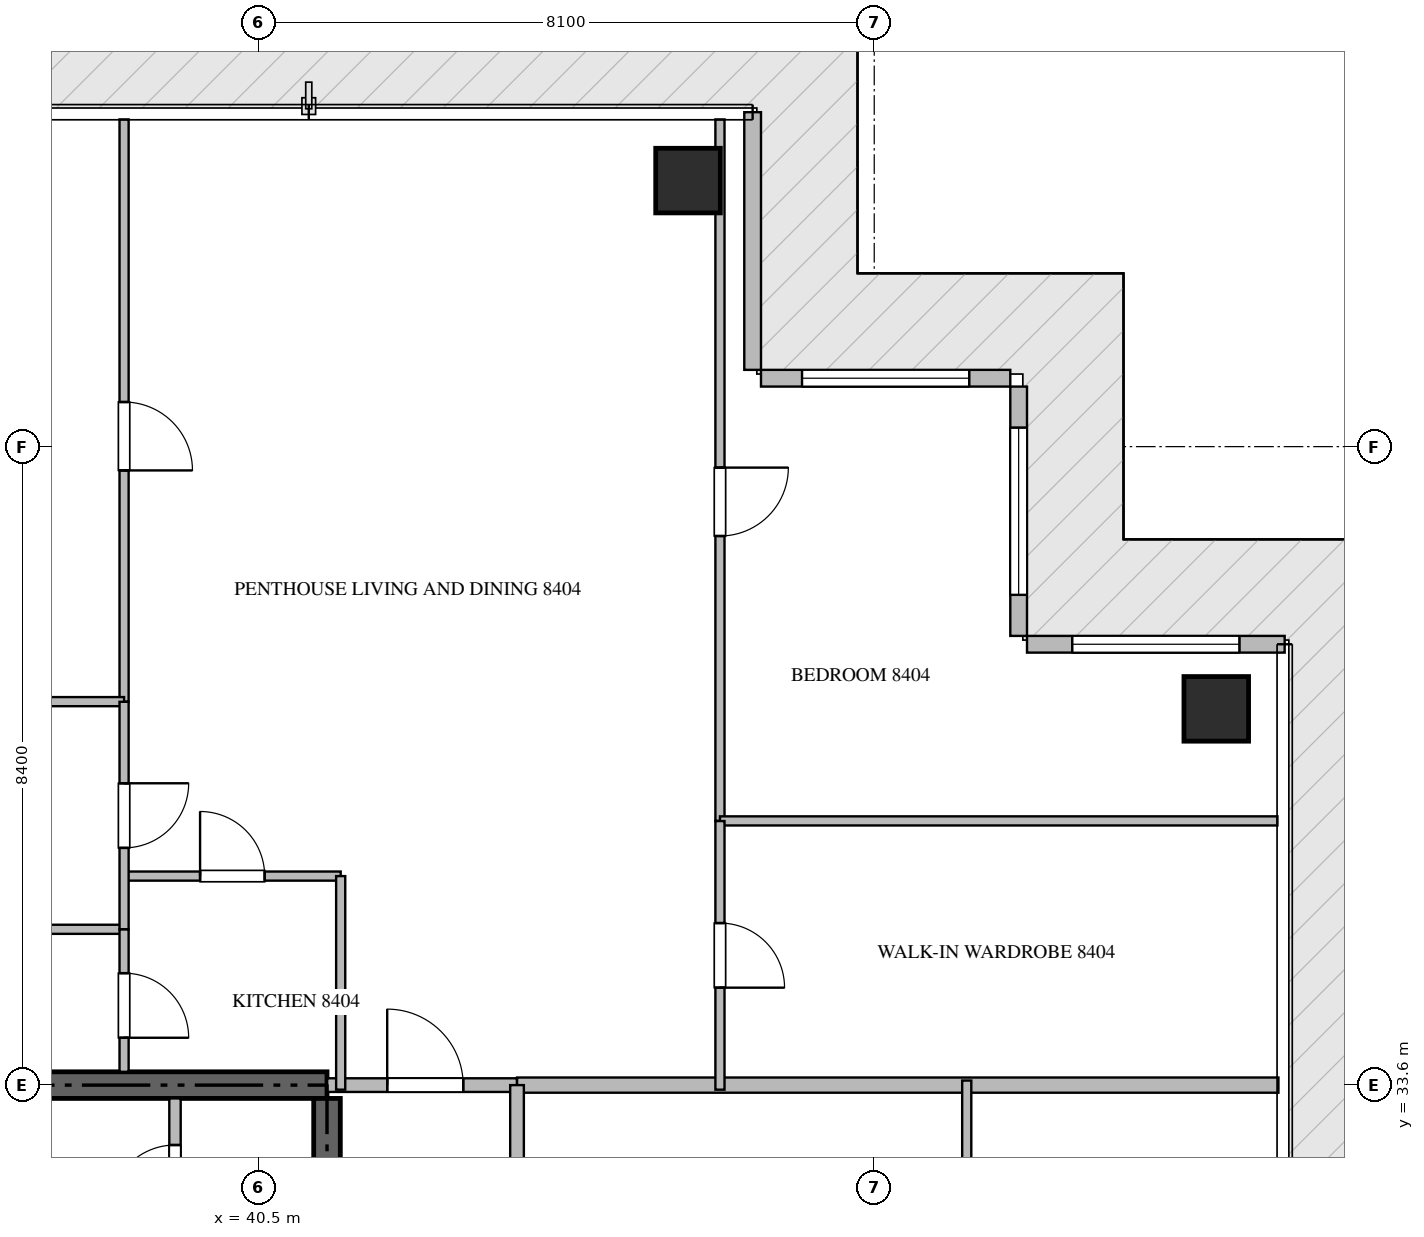
"""IFC4 building model, lengths in metres.
Left out: names, types, materials, properties, quantities, classifications, styles, units other than length and angle.
Written with IfcOpenShell. Run it as: python <this file> out.ifc"""

import sys

from ifc_helpers import new_model, si_unit, direction, frame, frame_2d, origin, origin_2d, place, context, subcontext, project, spatial, rectangle, extrude, source, transform, mapped, element, fill, save


model = new_model("IFC4")
c1 = context("Model", 3, precision=1e-05, world=origin(), true_north=direction((0.0, 1.0)))
c2 = subcontext(c1, "Body", "Model", "MODEL_VIEW")
j1 = project(units=[si_unit("LENGTHUNIT", "METRE"), si_unit("PLANEANGLEUNIT", "RADIAN")], contexts=[c1])
p1 = place(None, origin())
s1 = spatial("IfcSite", under=j1, at=p1, CompositionType="ELEMENT")
p2 = place(p1, origin())
s2 = spatial("IfcBuilding", under=s1, at=p2, CompositionType="ELEMENT")
p3 = place(p2, frame((0.0, 0.0, 338.0)))
s3 = spatial("IfcBuildingStorey", under=s2, at=p3, CompositionType="ELEMENT", Elevation=338.0)
p4 = place(p3, frame((41.4, 33.6, -0.44), z_axis=(0.0, 0.0, 1.0), x_axis=(-1.0, 0.0, 0.0)))
e1 = element("IfcWall", 1, at=p4, inside=s3, PredefinedType="SHEAR", context=c2, shape_type="SweptSolid", body=[
    extrude(rectangle(XDim=18.0, YDim=0.35, at=frame_2d((9.0, 0.0))), origin(), (0.0, 0.0, 1.0), 4.228),
])
p5 = place(p3, frame((41.4, 27.75, -0.44), z_axis=(0.0, 0.0, 1.0), x_axis=(0.0, 1.0, 0.0)))
e2 = element("IfcWall", 2, at=p5, inside=s3, PredefinedType="SHEAR", context=c2, shape_type="SweptSolid", body=[
    extrude(rectangle(XDim=5.675, YDim=0.35, at=frame_2d((2.837, 0.0))), origin(), (0.0, 0.0, 1.0), 4.228),
])
m1 = source(origin(), c2, "Body", "SweptSolid", [
    extrude(rectangle(XDim=0.85, YDim=0.85, at=origin_2d()), origin(), (0.0, 0.0, 1.0), 4.23),
])
for number, where, z_axis, x_axis in (
    (3, (46.15, 45.5, -0.44), (0.0, 0.0, 1.0), (1.0, 0.0, 0.0)),
    (4, (53.1, 38.55, -0.44), (0.0, 0.0, 1.0), (1.0, 0.0, 0.0)),
):
    element("IfcColumn", number, at=place(p3, frame(where, z_axis=z_axis, x_axis=x_axis)), inside=s3, PredefinedType="COLUMN", context=c2, shape_type="MappedRepresentation", body=[
        mapped(m1, transform((0.0, 0.0, 0.0), scale=1.0)),
    ])
p6 = place(p3, frame((54.0, 39.4, 0.0), z_axis=(0.0, 0.0, 1.0), x_axis=(-1.0, 0.0, 0.0)))
e5 = element("IfcWall", 5, at=p6, inside=s3, PredefinedType="ELEMENTEDWALL", context=c2, shape_type="SweptSolid", body=[
    extrude(rectangle(XDim=3.39, YDim=0.22, at=frame_2d((1.695, 0.0))), origin(), (0.0, 0.0, 1.0), 3.775),
])
p7 = place(p6, frame((0.595, 0.0, 0.65)))
e6 = element("IfcOpeningElement", 6, at=p7, cuts=e5, PredefinedType="OPENING", context=c2, shape_type="SweptSolid", body=[
    extrude(rectangle(XDim=2.2, YDim=2.4, at=frame_2d((1.1, 1.2))), frame((0.0, 0.12, 0.0), z_axis=(0.0, -1.0, 0.0), x_axis=(1.0, 0.0, 0.0)), (0.0, 0.0, 1.0), 0.24),
])
p8 = place(p3, frame((50.5, 39.51, 0.0), z_axis=(0.0, 0.0, 1.0), x_axis=(0.0, 1.0, 0.0)))
e7 = element("IfcWall", 7, at=p8, inside=s3, PredefinedType="ELEMENTEDWALL", context=c2, shape_type="SweptSolid", body=[
    extrude(rectangle(XDim=3.28, YDim=0.22, at=frame_2d((1.64, 0.0))), origin(), (0.0, 0.0, 1.0), 3.775),
])
p9 = place(p8, frame((0.54, 0.0, 0.65)))
e8 = element("IfcOpeningElement", 8, at=p9, cuts=e7, PredefinedType="OPENING", context=c2, shape_type="SweptSolid", body=[
    extrude(rectangle(XDim=2.2, YDim=2.4, at=frame_2d((1.1, 1.2))), frame((0.0, 0.12, 0.0), z_axis=(0.0, -1.0, 0.0), x_axis=(1.0, 0.0, 0.0)), (0.0, 0.0, 1.0), 0.24),
])
p10 = place(p3, frame((50.39, 42.9, 0.0), z_axis=(0.0, 0.0, 1.0), x_axis=(-1.0, 0.0, 0.0)))
e9 = element("IfcWall", 9, at=p10, inside=s3, PredefinedType="ELEMENTEDWALL", context=c2, shape_type="SweptSolid", body=[
    extrude(rectangle(XDim=3.28, YDim=0.22, at=frame_2d((1.64, 0.0))), origin(), (0.0, 0.0, 1.0), 3.775),
])
p11 = place(p10, frame((0.54, 0.0, 0.65)))
e10 = element("IfcOpeningElement", 10, at=p11, cuts=e9, PredefinedType="OPENING", context=c2, shape_type="SweptSolid", body=[
    extrude(rectangle(XDim=2.2, YDim=2.4, at=frame_2d((1.1, 1.2))), frame((0.0, 0.12, 0.0), z_axis=(0.0, -1.0, 0.0), x_axis=(1.0, 0.0, 0.0)), (0.0, 0.0, 1.0), 0.24),
])
p12 = place(p3, frame((47.0, 43.01, 0.0), z_axis=(0.0, 0.0, 1.0), x_axis=(0.0, 1.0, 0.0)))
e11 = element("IfcWall", 11, at=p12, inside=s3, PredefinedType="ELEMENTEDWALL", context=c2, shape_type="SweptSolid", body=[
    extrude(rectangle(XDim=3.39, YDim=0.22, at=frame_2d((1.695, 0.0))), origin(), (0.0, 0.0, 1.0), 3.775),
])
p13 = place(p3, frame((39.4, 31.35, 0.0), z_axis=(0.0, 0.0, 1.0), x_axis=(0.0, 1.0, 0.0)))
e12 = element("IfcWall", 12, at=p13, inside=s3, PredefinedType="PARTITIONING", context=c2, shape_type="SweptSolid", body=[
    extrude(rectangle(XDim=2.075, YDim=0.15, at=frame_2d((1.038, 0.0))), origin(), (0.0, 0.0, 1.0), 3.79),
])
p14 = place(p13, frame((0.612, 0.0, 0.0)))
e13 = element("IfcOpeningElement", 13, at=p14, cuts=e12, PredefinedType="OPENING", context=c2, shape_type="SweptSolid", body=[
    extrude(rectangle(XDim=0.85, YDim=2.1, at=frame_2d((0.425, 1.05))), frame((0.0, 0.085, 0.0), z_axis=(0.0, -1.0, 0.0), x_axis=(1.0, 0.0, 0.0)), (0.0, 0.0, 1.0), 0.17),
])
p15 = place(p3, frame((43.9, 33.6, 0.0), z_axis=(0.0, 0.0, 1.0), x_axis=(1.0, 0.0, 0.0)))
e14 = element("IfcWall", 14, at=p15, inside=s3, PredefinedType="PARTITIONING", context=c2, shape_type="SweptSolid", body=[
    extrude(rectangle(XDim=10.018, YDim=0.2, at=frame_2d((5.009, 0.0))), origin(), (0.0, 0.0, 1.0), 3.79),
])
p16 = place(p3, frame((41.402, 33.6, 0.0), z_axis=(0.0, 0.0, 1.0), x_axis=(1.0, 0.0, 0.0)))
e15 = element("IfcWall", 15, at=p16, inside=s3, PredefinedType="PARTITIONING", context=c2, shape_type="SweptSolid", body=[
    extrude(rectangle(XDim=2.496, YDim=0.18, at=frame_2d((1.248, 0.0))), origin(), (0.0, 0.0, 1.0), 3.79),
])
p17 = place(p16, frame((0.79, 0.0, 0.0)))
e16 = element("IfcOpeningElement", 16, at=p17, cuts=e15, PredefinedType="OPENING", context=c2, shape_type="SweptSolid", body=[
    extrude(rectangle(XDim=1.0, YDim=2.15, at=frame_2d((0.5, 1.075))), frame((0.0, 0.1, 0.0), z_axis=(0.0, -1.0, 0.0), x_axis=(1.0, 0.0, 0.0)), (0.0, 0.0, 1.0), 0.2),
])
p18 = place(p3, frame((43.9, 16.8, 0.0), z_axis=(0.0, 0.0, 1.0), x_axis=(0.0, 1.0, 0.0)))
e17 = element("IfcWall", 17, at=p18, inside=s3, PredefinedType="PARTITIONING", context=c2, shape_type="SweptSolid", body=[
    extrude(rectangle(XDim=16.8, YDim=0.18, at=frame_2d((8.4, 0.0))), origin(), (0.0, 0.0, 1.0), 3.79),
])
p19 = place(p18, frame((1.3, 0.0, 0.0)))
e18 = element("IfcOpeningElement", 18, at=p19, cuts=e17, PredefinedType="OPENING", context=c2, shape_type="SweptSolid", body=[
    extrude(rectangle(XDim=1.0, YDim=2.15, at=frame_2d((0.5, 1.075))), frame((0.0, 0.1, 0.0), z_axis=(0.0, -1.0, 0.0), x_axis=(1.0, 0.0, 0.0)), (0.0, 0.0, 1.0), 0.2),
])
p20 = place(p3, frame((38.73, 36.35, 0.0), z_axis=(0.0, 0.0, 1.0), x_axis=(1.0, 0.0, 0.0)))
e19 = element("IfcWall", 19, at=p20, inside=s3, PredefinedType="PARTITIONING", context=c2, shape_type="SweptSolid", body=[
    extrude(rectangle(XDim=2.85, YDim=0.12, at=frame_2d((1.425, 0.0))), origin(), (0.0, 0.0, 1.0), 3.79),
])
p21 = place(p20, frame((1.0, 0.0, 0.0)))
e20 = element("IfcOpeningElement", 20, at=p21, cuts=e19, PredefinedType="OPENING", context=c2, shape_type="SweptSolid", body=[
    extrude(rectangle(XDim=0.85, YDim=2.1, at=frame_2d((0.425, 1.05))), frame((0.0, 0.07, 0.0), z_axis=(0.0, -1.0, 0.0), x_axis=(1.0, 0.0, 0.0)), (0.0, 0.0, 1.0), 0.14),
])
p22 = place(p3, frame((41.58, 36.35, 0.0), z_axis=(0.0, 0.0, 1.0), x_axis=(0.0, -1.0, 0.0)))
e21 = element("IfcWall", 21, at=p22, inside=s3, PredefinedType="PARTITIONING", context=c2, shape_type="SweptSolid", body=[
    extrude(rectangle(XDim=2.81, YDim=0.12, at=frame_2d((1.405, 0.0))), origin(), (0.0, 0.0, 1.0), 3.79),
])
p23 = place(p3, frame((38.73, 46.305, 0.0), z_axis=(0.0, 0.0, 1.0), x_axis=(0.0, -1.0, 0.0)))
e22 = element("IfcWall", 22, at=p23, inside=s3, PredefinedType="PARTITIONING", context=c2, shape_type="SweptSolid", body=[
    extrude(rectangle(XDim=7.66, YDim=0.12, at=frame_2d((3.83, 0.0))), origin(), (0.0, 0.0, 1.0), 3.79),
])
p24 = place(p23, frame((3.718, 0.0, 0.0)))
e23 = element("IfcOpeningElement", 23, at=p24, cuts=e22, PredefinedType="OPENING", context=c2, shape_type="SweptSolid", body=[
    extrude(rectangle(XDim=0.9, YDim=2.1, at=frame_2d((0.45, 1.05))), frame((0.0, 0.07, 0.0), z_axis=(0.0, -1.0, 0.0), x_axis=(1.0, 0.0, 0.0)), (0.0, 0.0, 1.0), 0.14),
])
p25 = place(p3, frame((33.14, 38.645, 0.0), z_axis=(0.0, 0.0, 1.0), x_axis=(1.0, 0.0, 0.0)))
e24 = element("IfcWall", 24, at=p25, inside=s3, PredefinedType="PARTITIONING", context=c2, shape_type="SweptSolid", body=[
    extrude(rectangle(XDim=5.59, YDim=0.12, at=frame_2d((2.795, 0.0))), origin(), (0.0, 0.0, 1.0), 3.412),
])
p26 = place(p3, frame((33.262, 35.65, 0.0), z_axis=(0.0, 0.0, 1.0), x_axis=(1.0, 0.0, 0.0)))
e25 = element("IfcWall", 25, at=p26, inside=s3, PredefinedType="PARTITIONING", context=c2, shape_type="SweptSolid", body=[
    extrude(rectangle(XDim=5.468, YDim=0.12, at=frame_2d((2.734, 0.0))), origin(), (0.0, 0.0, 1.0), 3.79),
])
p27 = place(p3, frame((38.73, 38.643, 0.0), z_axis=(0.0, 0.0, 1.0), x_axis=(0.0, -1.0, 0.0)))
e26 = element("IfcWall", 26, at=p27, inside=s3, PredefinedType="PARTITIONING", context=c2, shape_type="SweptSolid", body=[
    extrude(rectangle(XDim=2.993, YDim=0.12, at=frame_2d((1.497, 0.0))), origin(), (0.0, 0.0, 1.0), 3.79),
])
p28 = place(p27, frame((1.072, 0.0, 0.0)))
e27 = element("IfcOpeningElement", 27, at=p28, cuts=e26, PredefinedType="OPENING", context=c2, shape_type="SweptSolid", body=[
    extrude(rectangle(XDim=0.85, YDim=2.1, at=frame_2d((0.425, 1.05))), frame((0.0, 0.07, 0.0), z_axis=(0.0, -1.0, 0.0), x_axis=(1.0, 0.0, 0.0)), (0.0, 0.0, 1.0), 0.14),
])
p29 = place(p3, frame((38.73, 35.648, 0.0), z_axis=(0.0, 0.0, 1.0), x_axis=(0.0, -1.0, 0.0)))
e28 = element("IfcWall", 28, at=p29, inside=s3, PredefinedType="PARTITIONING", context=c2, shape_type="SweptSolid", body=[
    extrude(rectangle(XDim=1.873, YDim=0.12, at=frame_2d((0.937, 0.0))), origin(), (0.0, 0.0, 1.0), 3.79),
])
p30 = place(p29, frame((0.575, 0.0, 0.0)))
e29 = element("IfcOpeningElement", 29, at=p30, cuts=e28, PredefinedType="OPENING", context=c2, shape_type="SweptSolid", body=[
    extrude(rectangle(XDim=0.85, YDim=2.1, at=frame_2d((0.425, 1.05))), frame((0.0, 0.07, 0.0), z_axis=(0.0, -1.0, 0.0), x_axis=(1.0, 0.0, 0.0)), (0.0, 0.0, 1.0), 0.14),
])
p31 = place(p3, frame((46.57, 46.305, 0.0), z_axis=(0.0, 0.0, 1.0), x_axis=(0.0, -1.0, 0.0)))
e30 = element("IfcWall", 30, at=p31, inside=s3, PredefinedType="PARTITIONING", context=c2, shape_type="SweptSolid", body=[
    extrude(rectangle(XDim=9.229, YDim=0.12, at=frame_2d((4.615, 0.0))), origin(), (0.0, 0.0, 1.0), 3.79),
])
p32 = place(p31, frame((4.581, 0.0, 0.0)))
e31 = element("IfcOpeningElement", 31, at=p32, cuts=e30, PredefinedType="OPENING", context=c2, shape_type="SweptSolid", body=[
    extrude(rectangle(XDim=0.9, YDim=2.1, at=frame_2d((0.45, 1.05))), frame((0.0, 0.07, 0.0), z_axis=(0.0, -1.0, 0.0), x_axis=(1.0, 0.0, 0.0)), (0.0, 0.0, 1.0), 0.14),
])
p33 = place(p3, frame((46.57, 37.076, 0.0), z_axis=(0.0, 0.0, 1.0), x_axis=(1.0, 0.0, 0.0)))
e32 = element("IfcWall", 32, at=p33, inside=s3, PredefinedType="PARTITIONING", context=c2, shape_type="SweptSolid", body=[
    extrude(rectangle(XDim=7.335, YDim=0.12, at=frame_2d((3.667, 0.0))), origin(), (0.0, 0.0, 1.0), 3.79),
])
p34 = place(p3, frame((46.57, 37.074, 0.0), z_axis=(0.0, 0.0, 1.0), x_axis=(0.0, -1.0, 0.0)))
e33 = element("IfcWall", 33, at=p34, inside=s3, PredefinedType="PARTITIONING", context=c2, shape_type="SweptSolid", body=[
    extrude(rectangle(XDim=3.534, YDim=0.12, at=frame_2d((1.767, 0.0))), origin(), (0.0, 0.0, 1.0), 3.79),
])
p35 = place(p34, frame((1.342, 0.0, 0.0)))
e34 = element("IfcOpeningElement", 34, at=p35, cuts=e33, PredefinedType="OPENING", context=c2, shape_type="SweptSolid", body=[
    extrude(rectangle(XDim=0.85, YDim=2.1, at=frame_2d((0.425, 1.05))), frame((0.0, 0.07, 0.0), z_axis=(0.0, -1.0, 0.0), x_axis=(1.0, 0.0, 0.0)), (0.0, 0.0, 1.0), 0.14),
])
p36 = place(p3, frame((49.817, 23.18, 0.0), z_axis=(0.0, 0.0, 1.0), x_axis=(0.0, 1.0, 0.0)))
e35 = element("IfcWall", 35, at=p36, inside=s3, PredefinedType="PARTITIONING", context=c2, shape_type="SweptSolid", body=[
    extrude(rectangle(XDim=10.48, YDim=0.12, at=frame_2d((5.24, 0.0))), origin(), (0.0, 0.0, 1.0), 3.79),
])
m2 = source(origin(), c2, "Body", "SweptSolid", [
    extrude(rectangle(XDim=2.2, YDim=2.4, at=frame_2d((1.1, 1.2))), frame((0.0, 0.03, 0.0), z_axis=(0.0, -1.0, 0.0), x_axis=(1.0, 0.0, 0.0)), (0.0, 0.0, 1.0), 0.06),
])
p37 = place(p7, origin())
e36 = element("IfcWindow", 36, at=p37, inside=s3, PartitioningType="SINGLE_PANEL", PredefinedType="WINDOW", context=c2, shape_type="MappedRepresentation", body=[
    mapped(m2, transform((0.0, 0.0, 0.0), scale=1.0)),
])
fill(e6, e36)
p38 = place(p9, origin())
e37 = element("IfcWindow", 37, at=p38, inside=s3, PartitioningType="SINGLE_PANEL", PredefinedType="WINDOW", context=c2, shape_type="MappedRepresentation", body=[
    mapped(m2, transform((0.0, 0.0, 0.0), scale=1.0)),
])
fill(e8, e37)
p39 = place(p11, origin())
e38 = element("IfcWindow", 38, at=p39, inside=s3, PartitioningType="SINGLE_PANEL", PredefinedType="WINDOW", context=c2, shape_type="MappedRepresentation", body=[
    mapped(m2, transform((0.0, 0.0, 0.0), scale=1.0)),
])
fill(e10, e38)
m3 = source(origin(), c2, "Body", "SweptSolid", [
    extrude(rectangle(XDim=0.85, YDim=2.1, at=frame_2d((0.425, 1.05))), frame((0.0, 0.025, 0.0), z_axis=(0.0, -1.0, 0.0), x_axis=(1.0, 0.0, 0.0)), (0.0, 0.0, 1.0), 0.05),
])
p40 = place(p14, origin())
e39 = element("IfcDoor", 39, at=p40, inside=s3, OperationType="SINGLE_SWING_LEFT", PredefinedType="DOOR", context=c2, shape_type="MappedRepresentation", body=[
    mapped(m3, transform((0.0, 0.0, 0.0), scale=1.0)),
])
fill(e13, e39)
m4 = source(origin(), c2, "Body", "SweptSolid", [
    extrude(rectangle(XDim=1.0, YDim=2.15, at=frame_2d((0.5, 1.075))), frame((0.0, 0.025, 0.0), z_axis=(0.0, -1.0, 0.0), x_axis=(1.0, 0.0, 0.0)), (0.0, 0.0, 1.0), 0.05),
])
p41 = place(p17, origin())
e40 = element("IfcDoor", 40, at=p41, inside=s3, OperationType="SINGLE_SWING_LEFT", PredefinedType="DOOR", context=c2, shape_type="MappedRepresentation", body=[
    mapped(m4, transform((0.0, 0.0, 0.0), scale=1.0)),
])
fill(e16, e40)
p42 = place(p21, origin())
e41 = element("IfcDoor", 41, at=p42, inside=s3, OperationType="SINGLE_SWING_LEFT", PredefinedType="DOOR", context=c2, shape_type="MappedRepresentation", body=[
    mapped(m3, transform((0.0, 0.0, 0.0), scale=1.0)),
])
fill(e20, e41)
m5 = source(origin(), c2, "Body", "SweptSolid", [
    extrude(rectangle(XDim=0.9, YDim=2.1, at=frame_2d((0.45, 1.05))), frame((0.0, 0.025, 0.0), z_axis=(0.0, -1.0, 0.0), x_axis=(1.0, 0.0, 0.0)), (0.0, 0.0, 1.0), 0.05),
])
p43 = place(p24, origin())
e42 = element("IfcDoor", 42, at=p43, inside=s3, OperationType="SINGLE_SWING_RIGHT", PredefinedType="DOOR", context=c2, shape_type="MappedRepresentation", body=[
    mapped(m5, transform((0.0, 0.0, 0.0), scale=1.0)),
])
fill(e23, e42)
p44 = place(p28, origin())
e43 = element("IfcDoor", 43, at=p44, inside=s3, OperationType="SINGLE_SWING_LEFT", PredefinedType="DOOR", context=c2, shape_type="MappedRepresentation", body=[
    mapped(m3, transform((0.0, 0.0, 0.0), scale=1.0)),
])
fill(e27, e43)
p45 = place(p30, origin())
e44 = element("IfcDoor", 44, at=p45, inside=s3, OperationType="SINGLE_SWING_RIGHT", PredefinedType="DOOR", context=c2, shape_type="MappedRepresentation", body=[
    mapped(m3, transform((0.0, 0.0, 0.0), scale=1.0)),
])
fill(e29, e44)
p46 = place(p32, origin())
e45 = element("IfcDoor", 45, at=p46, inside=s3, OperationType="SINGLE_SWING_LEFT", PredefinedType="DOOR", context=c2, shape_type="MappedRepresentation", body=[
    mapped(m5, transform((0.0, 0.0, 0.0), scale=1.0)),
])
fill(e31, e45)
p47 = place(p35, origin())
e46 = element("IfcDoor", 46, at=p47, inside=s3, OperationType="SINGLE_SWING_RIGHT", PredefinedType="DOOR", context=c2, shape_type="MappedRepresentation", body=[
    mapped(m3, transform((0.0, 0.0, 0.0), scale=1.0)),
])
fill(e34, e46)
save(model, sys.argv[1])
